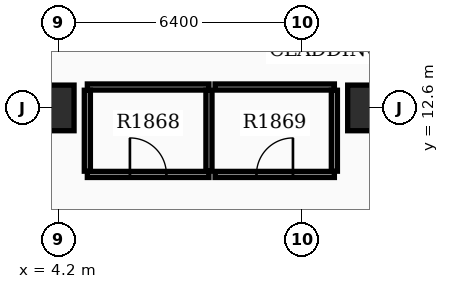
"""IFC4 building model, lengths in metres.
Left out: names, types, materials, properties, quantities, classifications, styles, units other than length and angle.
Written with IfcOpenShell. Run it as: python <this file> out.ifc"""

import sys

from ifc_helpers import new_model, si_unit, direction, frame, frame_2d, origin, origin_2d, place, context, subcontext, project, spatial, rectangle, extrude, element, fill, save


model = new_model("IFC4")
c1 = context("Model", 3, precision=1e-05, world=origin(), true_north=direction((0.0, 1.0)))
c2 = subcontext(c1, "Body", "Model", "MODEL_VIEW")
j1 = project(units=[si_unit("LENGTHUNIT", "METRE"), si_unit("PLANEANGLEUNIT", "RADIAN")], contexts=[c1])
p1 = place(None, origin())
s1 = spatial("IfcSite", under=j1, at=p1, CompositionType="ELEMENT")
p2 = place(p1, origin())
s2 = spatial("IfcBuilding", under=s1, at=p2, CompositionType="ELEMENT")
p3 = place(p2, frame((0.0, 0.0, 120.3)))
s3 = spatial("IfcBuildingStorey", under=s2, at=p3, CompositionType="ELEMENT", Elevation=120.3)
for number, where, z_axis, x_axis in (
    (1, (12.4, 12.6, 0.0), (0.0, 0.0, 1.0), (1.0, 0.0, 0.0)),
    (2, (4.0, 12.6, 0.0), (0.0, 0.0, 1.0), (1.0, 0.0, 0.0)),
):
    element("IfcColumn", number, at=place(p3, frame(where, z_axis=z_axis, x_axis=x_axis)), inside=s3, PredefinedType="COLUMN", context=c2, shape_type="SweptSolid", body=[
        extrude(rectangle(XDim=1.2, YDim=1.2, at=origin_2d()), origin(), (0.0, 0.0, 1.0), 3.9),
    ])
p4 = place(p3, frame((4.95, 10.85, 0.0), z_axis=(0.0, 0.0, 1.0), x_axis=(1.0, 0.0, 0.0)))
e3 = element("IfcWall", 3, at=p4, inside=s3, PredefinedType="PARTITIONING", context=c2, shape_type="SweptSolid", body=[
    extrude(rectangle(XDim=3.2, YDim=0.16, at=frame_2d((1.6, 0.0))), origin(), (0.0, 0.0, 1.0), 2.96),
])
p5 = place(p4, frame((1.12, 0.0, 0.0)))
e4 = element("IfcOpeningElement", 4, at=p5, cuts=e3, PredefinedType="OPENING", context=c2, shape_type="SweptSolid", body=[
    extrude(rectangle(XDim=0.96, YDim=2.15, at=frame_2d((0.48, 1.075))), frame((0.0, 0.09, 0.0), z_axis=(0.0, -1.0, 0.0), x_axis=(1.0, 0.0, 0.0)), (0.0, 0.0, 1.0), 0.18),
])
p6 = place(p3, frame((4.95, 13.15, 0.0), z_axis=(0.0, 0.0, 1.0), x_axis=(1.0, 0.0, 0.0)))
e5 = element("IfcWall", 5, at=p6, inside=s3, PredefinedType="PARTITIONING", context=c2, shape_type="SweptSolid", body=[
    extrude(rectangle(XDim=3.2, YDim=0.16, at=frame_2d((1.6, 0.0))), origin(), (0.0, 0.0, 1.0), 2.96),
])
for number, where, z_axis, x_axis in (
    (6, (4.95, 10.935, 0.0), (0.0, 0.0, 1.0), (0.0, 1.0, 0.0)),
    (7, (8.15, 10.935, 0.0), (0.0, 0.0, 1.0), (0.0, 1.0, 0.0)),
):
    element("IfcWall", number, at=place(p3, frame(where, z_axis=z_axis, x_axis=x_axis)), inside=s3, PredefinedType="PARTITIONING", context=c2, shape_type="SweptSolid", body=[
        extrude(rectangle(XDim=2.13, YDim=0.16, at=frame_2d((1.065, 0.0))), origin(), (0.0, 0.0, 1.0), 2.96),
    ])
p7 = place(p3, frame((8.31, 10.85, 0.0), z_axis=(0.0, 0.0, 1.0), x_axis=(1.0, 0.0, 0.0)))
e8 = element("IfcWall", 8, at=p7, inside=s3, PredefinedType="PARTITIONING", context=c2, shape_type="SweptSolid", body=[
    extrude(rectangle(XDim=3.14, YDim=0.16, at=frame_2d((1.57, 0.0))), origin(), (0.0, 0.0, 1.0), 2.96),
])
p8 = place(p7, frame((1.09, 0.0, 0.0)))
e9 = element("IfcOpeningElement", 9, at=p8, cuts=e8, PredefinedType="OPENING", context=c2, shape_type="SweptSolid", body=[
    extrude(rectangle(XDim=0.96, YDim=2.15, at=frame_2d((0.48, 1.075))), frame((0.0, 0.09, 0.0), z_axis=(0.0, -1.0, 0.0), x_axis=(1.0, 0.0, 0.0)), (0.0, 0.0, 1.0), 0.18),
])
p9 = place(p3, frame((8.31, 13.15, 0.0), z_axis=(0.0, 0.0, 1.0), x_axis=(1.0, 0.0, 0.0)))
e10 = element("IfcWall", 10, at=p9, inside=s3, PredefinedType="PARTITIONING", context=c2, shape_type="SweptSolid", body=[
    extrude(rectangle(XDim=3.14, YDim=0.16, at=frame_2d((1.57, 0.0))), origin(), (0.0, 0.0, 1.0), 2.96),
])
p10 = place(p3, frame((11.45, 10.935, 0.0), z_axis=(0.0, 0.0, 1.0), x_axis=(0.0, 1.0, 0.0)))
e11 = element("IfcWall", 11, at=p10, inside=s3, PredefinedType="PARTITIONING", context=c2, shape_type="SweptSolid", body=[
    extrude(rectangle(XDim=2.13, YDim=0.16, at=frame_2d((1.065, 0.0))), origin(), (0.0, 0.0, 1.0), 2.96),
])
p11 = place(p5, origin())
e12 = element("IfcDoor", 12, at=p11, inside=s3, OperationType="SINGLE_SWING_LEFT", PredefinedType="DOOR", context=c2, shape_type="SweptSolid", body=[
    extrude(rectangle(XDim=0.96, YDim=2.15, at=frame_2d((0.48, 1.075))), frame((0.0, 0.025, 0.0), z_axis=(0.0, -1.0, 0.0), x_axis=(1.0, 0.0, 0.0)), (0.0, 0.0, 1.0), 0.05),
])
fill(e4, e12)
p12 = place(p8, origin())
e13 = element("IfcDoor", 13, at=p12, inside=s3, OperationType="SINGLE_SWING_RIGHT", PredefinedType="DOOR", context=c2, shape_type="SweptSolid", body=[
    extrude(rectangle(XDim=0.96, YDim=2.15, at=frame_2d((0.48, 1.075))), frame((0.0, 0.025, 0.0), z_axis=(0.0, -1.0, 0.0), x_axis=(1.0, 0.0, 0.0)), (0.0, 0.0, 1.0), 0.05),
])
fill(e9, e13)
save(model, sys.argv[1])
